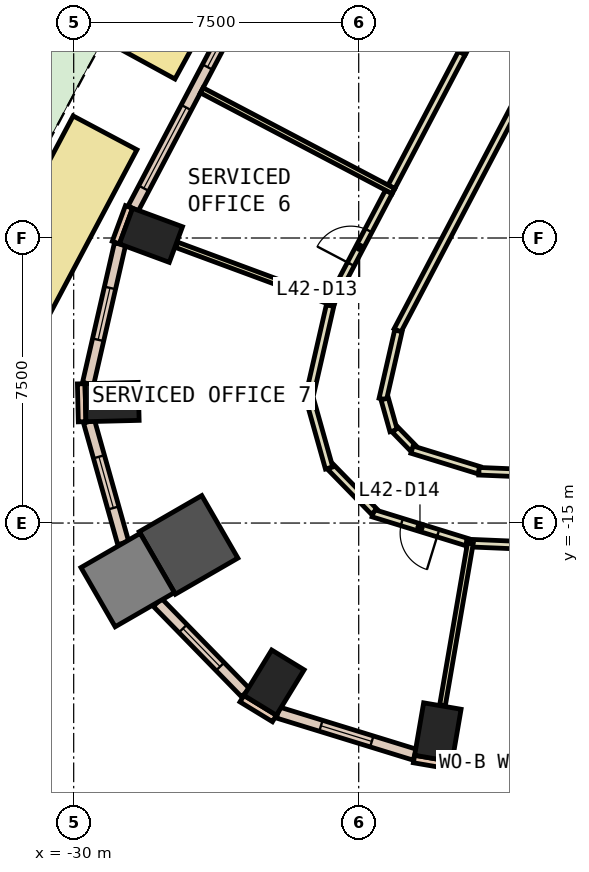
"""IFC4 building model, lengths in metres.
Left out: names, types, materials, properties, quantities, classifications, styles, units other than length and angle.
Written with IfcOpenShell. Run it as: python <this file> out.ifc"""

import sys

from ifc_helpers import new_model, si_unit, direction, frame, frame_2d, origin, origin_2d, place, context, subcontext, project, spatial, rectangle, extrude, element, fill, save


model = new_model("IFC4")
c1 = context("Model", 3, precision=1e-05, world=origin(), true_north=direction((0.0, 1.0)))
c2 = subcontext(c1, "Body", "Model", "MODEL_VIEW")
j1 = project(units=[si_unit("LENGTHUNIT", "METRE"), si_unit("PLANEANGLEUNIT", "RADIAN")], contexts=[c1])
p1 = place(None, origin())
s1 = spatial("IfcSite", under=j1, at=p1, CompositionType="ELEMENT")
p2 = place(p1, origin())
s2 = spatial("IfcBuilding", under=s1, at=p2, CompositionType="ELEMENT")
p3 = place(p2, frame((0.0, 0.0, 189.8)))
s3 = spatial("IfcBuildingStorey", under=s2, at=p3, CompositionType="ELEMENT", Elevation=189.8)
for number, where, z_axis, x_axis in (
    (1, (-20.417, -20.505, 0.0), (0.0, 0.0, 1.0), (-0.986, 0.169, 0.0)),
    (2, (-27.967, -7.429, 0.0), (0.0, 0.0, 1.0), (0.347, 0.938, 0.0)),
    (3, (-28.99, -11.816, 0.0), (0.0, 0.0, 1.0), (-0.025, 1.0, 0.0)),
):
    element("IfcColumn", number, at=place(p3, frame(where, z_axis=z_axis, x_axis=x_axis)), inside=s3, PredefinedType="COLUMN", context=c2, shape_type="SweptSolid", body=[
        extrude(rectangle(XDim=1.0, YDim=1.4, at=origin_2d()), origin(), (0.0, 0.0, 1.0), 3.8),
    ])
p4 = place(p3, frame((-26.977, -15.575, 0.0), z_axis=(0.0, 0.0, 1.0), x_axis=(0.866025403784, 0.5, 0.0)))
e4 = element("IfcColumn", 4, at=p4, inside=s3, PredefinedType="COLUMN", context=c2, shape_type="SweptSolid", body=[
    extrude(rectangle(XDim=1.9, YDim=1.9, at=origin_2d()), origin(), (0.0, 0.0, 1.0), 3.8),
])
p5 = place(p3, frame((-24.728, -19.199, 0.0), z_axis=(0.0, 0.0, 1.0), x_axis=(-0.853423465127, 0.521218178089, 0.0)))
e5 = element("IfcColumn", 5, at=p5, inside=s3, PredefinedType="COLUMN", context=c2, shape_type="SweptSolid", body=[
    extrude(rectangle(XDim=1.0, YDim=1.4, at=origin_2d()), origin(), (0.0, 0.0, 1.0), 3.8),
])
p6 = place(p3, frame((-28.579, -16.5, 0.0), z_axis=(0.0, 0.0, 1.0), x_axis=(0.866025403784, 0.5, 0.0)))
e6 = element("IfcColumn", 6, at=p6, inside=s3, PredefinedType="COLUMN", context=c2, shape_type="SweptSolid", body=[
    extrude(rectangle(XDim=1.8, YDim=1.8, at=origin_2d()), origin(), (0.0, 0.0, 1.0), 3.8),
])
for number, where, z_axis, x_axis in (
    (7, (-28.544, -6.683, 0.0), (0.0, 0.0, 1.0), (-0.347, -0.938, 0.0)),
    (8, (-21.045, -21.209, 0.0), (0.0, 0.0, 1.0), (0.986, -0.169, 0.0)),
):
    element("IfcWall", number, at=place(p3, frame(where, z_axis=z_axis, x_axis=x_axis)), inside=s3, PredefinedType="STANDARD", context=c2, shape_type="SweptSolid", body=[
        extrude(rectangle(XDim=1.0, YDim=0.2, at=frame_2d((0.5, 0.0))), origin(), (0.0, 0.0, 1.0), 3.8),
    ])
p7 = place(p3, frame((-29.802, -11.336, 0.0), z_axis=(0.0, 0.0, 1.0), x_axis=(0.023942303888, -0.999713341956, 0.0)))
e9 = element("IfcWall", 9, at=p7, inside=s3, PredefinedType="STANDARD", context=c2, shape_type="SweptSolid", body=[
    extrude(rectangle(XDim=0.999, YDim=0.2, at=frame_2d((0.5, 0.0))), origin(), (0.0, 0.0, 1.0), 3.8),
])
p8 = place(p3, frame((-25.572, -19.621, 0.0), z_axis=(0.0, 0.0, 1.0), x_axis=(0.853679739553, -0.520798331677, 0.0)))
e10 = element("IfcWall", 10, at=p8, inside=s3, PredefinedType="STANDARD", context=c2, shape_type="SweptSolid", body=[
    extrude(rectangle(XDim=1.0, YDim=0.2, at=frame_2d((0.5, 0.0))), origin(), (0.0, 0.0, 1.0), 3.8),
])
p9 = place(p3, frame((-20.041, -21.264, 0.0), z_axis=(0.0, 0.0, 1.0), x_axis=(0.999127941775, -0.041753514387, 0.0)))
e11 = element("IfcWall", 11, at=p9, inside=s3, PredefinedType="STANDARD", context=c2, shape_type="SweptSolid", body=[
    extrude(rectangle(XDim=5.368, YDim=0.3, at=frame_2d((2.684, 0.0))), origin(), (0.0, 0.0, 1.0), 3.8),
])
p10 = place(p9, frame((0.642, 0.0, 0.9)))
e12 = element("IfcOpeningElement", 12, at=p10, cuts=e11, PredefinedType="OPENING", context=c2, shape_type="SweptSolid", body=[
    extrude(rectangle(XDim=1.4, YDim=2.6, at=frame_2d((0.7, 1.3))), frame((0.0, 0.16, 0.0), z_axis=(0.0, -1.0, 0.0), x_axis=(1.0, 0.0, 0.0)), (0.0, 0.0, 1.0), 0.32),
])
p11 = place(p9, frame((3.326, 0.0, 0.9)))
e13 = element("IfcOpeningElement", 13, at=p11, cuts=e11, PredefinedType="OPENING", context=c2, shape_type="SweptSolid", body=[
    extrude(rectangle(XDim=1.4, YDim=2.6, at=frame_2d((0.7, 1.3))), frame((0.0, 0.16, 0.0), z_axis=(0.0, -1.0, 0.0), x_axis=(1.0, 0.0, 0.0)), (0.0, 0.0, 1.0), 0.32),
])
p12 = place(p3, frame((-25.08, -0.345, 0.0), z_axis=(0.0, 0.0, 1.0), x_axis=(-0.465478369088, -0.885059256723, 0.0)))
e14 = element("IfcWall", 14, at=p12, inside=s3, PredefinedType="STANDARD", context=c2, shape_type="SweptSolid", body=[
    extrude(rectangle(XDim=7.208, YDim=0.3, at=frame_2d((3.604, 0.0))), origin(), (0.0, 0.0, 1.0), 3.8),
])
p13 = place(p12, frame((0.602, 0.0, 0.9)))
e15 = element("IfcOpeningElement", 15, at=p13, cuts=e14, PredefinedType="OPENING", context=c2, shape_type="SweptSolid", body=[
    extrude(rectangle(XDim=2.4, YDim=2.6, at=frame_2d((1.2, 1.3))), frame((0.0, 0.16, 0.0), z_axis=(0.0, -1.0, 0.0), x_axis=(1.0, 0.0, 0.0)), (0.0, 0.0, 1.0), 0.32),
])
p14 = place(p12, frame((4.206, 0.0, 0.9)))
e16 = element("IfcOpeningElement", 16, at=p14, cuts=e14, PredefinedType="OPENING", context=c2, shape_type="SweptSolid", body=[
    extrude(rectangle(XDim=2.4, YDim=2.6, at=frame_2d((1.2, 1.3))), frame((0.0, 0.16, 0.0), z_axis=(0.0, -1.0, 0.0), x_axis=(1.0, 0.0, 0.0)), (0.0, 0.0, 1.0), 0.32),
])
p15 = place(p3, frame((-28.781, -7.66, 0.0), z_axis=(0.0, 0.0, 1.0), x_axis=(-0.223013094864, -0.974815448954, 0.0)))
e17 = element("IfcWall", 17, at=p15, inside=s3, PredefinedType="STANDARD", context=c2, shape_type="SweptSolid", body=[
    extrude(rectangle(XDim=3.767, YDim=0.3, at=frame_2d((1.884, 0.0))), origin(), (0.0, 0.0, 1.0), 3.8),
])
p16 = place(p15, frame((1.183, 0.0, 0.9)))
e18 = element("IfcOpeningElement", 18, at=p16, cuts=e17, PredefinedType="OPENING", context=c2, shape_type="SweptSolid", body=[
    extrude(rectangle(XDim=1.4, YDim=2.6, at=frame_2d((0.7, 1.3))), frame((0.0, 0.16, 0.0), z_axis=(0.0, -1.0, 0.0), x_axis=(1.0, 0.0, 0.0)), (0.0, 0.0, 1.0), 0.32),
])
p17 = place(p3, frame((-29.596, -12.33, 0.0), z_axis=(0.0, 0.0, 1.0), x_axis=(0.270798765166, -0.962635979374, 0.0)))
e19 = element("IfcWall", 19, at=p17, inside=s3, PredefinedType="STANDARD", context=c2, shape_type="SweptSolid", body=[
    extrude(rectangle(XDim=3.323, YDim=0.3, at=frame_2d((1.662, 0.0))), origin(), (0.0, 0.0, 1.0), 3.8),
])
p18 = place(p17, frame((0.962, 0.0, 0.9)))
e20 = element("IfcOpeningElement", 20, at=p18, cuts=e19, PredefinedType="OPENING", context=c2, shape_type="SweptSolid", body=[
    extrude(rectangle(XDim=1.4, YDim=2.6, at=frame_2d((0.7, 1.3))), frame((0.0, 0.16, 0.0), z_axis=(0.0, -1.0, 0.0), x_axis=(1.0, 0.0, 0.0)), (0.0, 0.0, 1.0), 0.32),
])
p19 = place(p3, frame((-27.797, -17.087, 0.0), z_axis=(0.0, 0.0, 1.0), x_axis=(0.698311919602, -0.71579358962, 0.0)))
e21 = element("IfcWall", 21, at=p19, inside=s3, PredefinedType="STANDARD", context=c2, shape_type="SweptSolid", body=[
    extrude(rectangle(XDim=3.324, YDim=0.3, at=frame_2d((1.662, 0.0))), origin(), (0.0, 0.0, 1.0), 3.8),
])
p20 = place(p19, frame((0.962, 0.0, 0.9)))
e22 = element("IfcOpeningElement", 22, at=p20, cuts=e21, PredefinedType="OPENING", context=c2, shape_type="SweptSolid", body=[
    extrude(rectangle(XDim=1.4, YDim=2.6, at=frame_2d((0.7, 1.3))), frame((0.0, 0.16, 0.0), z_axis=(0.0, -1.0, 0.0), x_axis=(1.0, 0.0, 0.0)), (0.0, 0.0, 1.0), 0.32),
])
p21 = place(p3, frame((-24.624, -19.986, 0.0), z_axis=(0.0, 0.0, 1.0), x_axis=(0.955692086233, -0.29436819854, 0.0)))
e23 = element("IfcWall", 23, at=p21, inside=s3, PredefinedType="STANDARD", context=c2, shape_type="SweptSolid", body=[
    extrude(rectangle(XDim=3.767, YDim=0.3, at=frame_2d((1.884, 0.0))), origin(), (0.0, 0.0, 1.0), 3.8),
])
p22 = place(p21, frame((1.183, 0.0, 0.9)))
e24 = element("IfcOpeningElement", 24, at=p22, cuts=e23, PredefinedType="OPENING", context=c2, shape_type="SweptSolid", body=[
    extrude(rectangle(XDim=1.4, YDim=2.6, at=frame_2d((0.7, 1.3))), frame((0.0, 0.16, 0.0), z_axis=(0.0, -1.0, 0.0), x_axis=(1.0, 0.0, 0.0)), (0.0, 0.0, 1.0), 0.32),
])
p23 = place(p3, frame((-25.793, 1.486, 0.0), z_axis=(0.0, 0.0, 1.0), x_axis=(-0.479445954257, -0.87757140846, 0.0)))
e25 = element("IfcWall", 25, at=p23, inside=s3, PredefinedType="STANDARD", context=c2, shape_type="SweptSolid", body=[
    extrude(rectangle(XDim=4.954, YDim=1.9, at=frame_2d((2.477, 0.0))), origin(), (0.0, 0.0, 1.0), 0.8),
])
p24 = place(p3, frame((-29.175, -4.733, 0.0), z_axis=(0.0, 0.0, 1.0), x_axis=(-0.468659554366, -0.883378866683, 0.0)))
e26 = element("IfcWall", 26, at=p24, inside=s3, PredefinedType="STANDARD", context=c2, shape_type="SweptSolid", body=[
    extrude(rectangle(XDim=5.115, YDim=1.9, at=frame_2d((2.557, 0.0))), origin(), (0.0, 0.0, 1.0), 0.8),
])
p25 = place(p3, frame((-18.112, -3.531, 0.0), z_axis=(0.0, 0.0, 1.0), x_axis=(-0.465461327558, -0.885068219149, 0.0)))
e27 = element("IfcWall", 27, at=p25, inside=s3, PredefinedType="PARTITIONING", context=c2, shape_type="SweptSolid", body=[
    extrude(rectangle(XDim=7.236, YDim=0.2, at=frame_2d((3.618, 0.0))), origin(), (0.0, 0.0, 1.0), 3.8),
])
p26 = place(p3, frame((-21.456, -9.944, 0.0), z_axis=(0.0, 0.0, 1.0), x_axis=(-0.222871656966, -0.974847795567, 0.0)))
e28 = element("IfcWall", 28, at=p26, inside=s3, PredefinedType="PARTITIONING", context=c2, shape_type="SweptSolid", body=[
    extrude(rectangle(XDim=1.839, YDim=0.2, at=frame_2d((0.919, 0.0))), origin(), (0.0, 0.0, 1.0), 3.8),
])
p27 = place(p3, frame((-21.816, -11.735, 0.0), z_axis=(0.0, 0.0, 1.0), x_axis=(0.270192443589, -0.962806337447, 0.0)))
e29 = element("IfcWall", 29, at=p27, inside=s3, PredefinedType="PARTITIONING", context=c2, shape_type="SweptSolid", body=[
    extrude(rectangle(XDim=0.869, YDim=0.2, at=frame_2d((0.435, 0.0))), origin(), (0.0, 0.0, 1.0), 3.8),
])
p28 = place(p3, frame((-21.538, -12.547, 0.0), z_axis=(0.0, 0.0, 1.0), x_axis=(0.697542638825, -0.716543276446, 0.0)))
e30 = element("IfcWall", 30, at=p28, inside=s3, PredefinedType="PARTITIONING", context=c2, shape_type="SweptSolid", body=[
    extrude(rectangle(XDim=0.668, YDim=0.2, at=frame_2d((0.334, 0.0))), origin(), (0.0, 0.0, 1.0), 3.8),
])
p29 = place(p3, frame((-21.097, -13.068, 0.0), z_axis=(0.0, 0.0, 1.0), x_axis=(0.955790442908, -0.294048685161, 0.0)))
e31 = element("IfcWall", 31, at=p29, inside=s3, PredefinedType="PARTITIONING", context=c2, shape_type="SweptSolid", body=[
    extrude(rectangle(XDim=1.846, YDim=0.2, at=frame_2d((0.923, 0.0))), origin(), (0.0, 0.0, 1.0), 3.8),
])
p30 = place(p3, frame((-19.336, -13.637, 0.0), z_axis=(0.0, 0.0, 1.0), x_axis=(0.999130261307, -0.041697972867, 0.0)))
e32 = element("IfcWall", 32, at=p30, inside=s3, PredefinedType="PARTITIONING", context=c2, shape_type="SweptSolid", body=[
    extrude(rectangle(XDim=5.422, YDim=0.2, at=frame_2d((2.711, 0.0))), origin(), (0.0, 0.0, 1.0), 3.8),
])
p31 = place(p3, frame((-21.638, -6.154, 0.0), z_axis=(0.0, 0.0, 1.0), x_axis=(0.465392595139, 0.885104362428, 0.0)))
e33 = element("IfcWall", 33, at=p31, inside=s3, PredefinedType="PARTITIONING", context=c2, shape_type="SweptSolid", body=[
    extrude(rectangle(XDim=3.982, YDim=0.2, at=frame_2d((1.991, 0.0))), origin(), (0.0, 0.0, 1.0), 3.8),
])
p32 = place(p3, frame((-19.785, -2.63, 0.0), z_axis=(0.0, 0.0, 1.0), x_axis=(0.482817232578, 0.875721142788, 0.0)))
e34 = element("IfcWall", 34, at=p32, inside=s3, PredefinedType="PARTITIONING", context=c2, shape_type="SweptSolid", body=[
    extrude(rectangle(XDim=8.04, YDim=0.2, at=frame_2d((4.02, 0.0))), origin(), (0.0, 0.0, 1.0), 3.8),
])
p33 = place(p32, frame((3.595, 0.0, 0.0)))
e35 = element("IfcOpeningElement", 35, at=p33, cuts=e34, PredefinedType="OPENING", context=c2, shape_type="SweptSolid", body=[
    extrude(rectangle(XDim=1.0, YDim=2.1, at=frame_2d((0.5, 1.05))), frame((0.0, 0.11, 0.0), z_axis=(0.0, -1.0, 0.0), x_axis=(1.0, 0.0, 0.0)), (0.0, 0.0, 1.0), 0.22),
])
p34 = place(p3, frame((-23.242, -9.204, 0.0), z_axis=(0.0, 0.0, 1.0), x_axis=(0.465431933571, 0.885083676955, 0.0)))
e36 = element("IfcWall", 36, at=p34, inside=s3, PredefinedType="PARTITIONING", context=c2, shape_type="SweptSolid", body=[
    extrude(rectangle(XDim=3.296, YDim=0.2, at=frame_2d((1.648, 0.0))), origin(), (0.0, 0.0, 1.0), 3.8),
])
p35 = place(p34, frame((1.148, 0.0, 0.0)))
e37 = element("IfcOpeningElement", 37, at=p35, cuts=e36, PredefinedType="OPENING", context=c2, shape_type="SweptSolid", body=[
    extrude(rectangle(XDim=1.0, YDim=2.1, at=frame_2d((0.5, 1.05))), frame((0.0, 0.11, 0.0), z_axis=(0.0, -1.0, 0.0), x_axis=(1.0, 0.0, 0.0)), (0.0, 0.0, 1.0), 0.22),
])
p36 = place(p3, frame((-19.657, -15.5, 0.0), z_axis=(0.0, 0.0, 1.0), x_axis=(-0.955612889251, 0.294625195625, 0.0)))
e38 = element("IfcWall", 38, at=p36, inside=s3, PredefinedType="PARTITIONING", context=c2, shape_type="SweptSolid", body=[
    extrude(rectangle(XDim=2.576, YDim=0.2, at=frame_2d((1.288, 0.0))), origin(), (0.0, 0.0, 1.0), 3.8),
])
p37 = place(p36, frame((0.788, 0.0, 0.0)))
e39 = element("IfcOpeningElement", 39, at=p37, cuts=e38, PredefinedType="OPENING", context=c2, shape_type="SweptSolid", body=[
    extrude(rectangle(XDim=1.0, YDim=2.1, at=frame_2d((0.5, 1.05))), frame((0.0, 0.11, 0.0), z_axis=(0.0, -1.0, 0.0), x_axis=(1.0, 0.0, 0.0)), (0.0, 0.0, 1.0), 0.22),
])
p38 = place(p3, frame((-22.093, -14.699, 0.0), z_axis=(0.0, 0.0, 1.0), x_axis=(-0.698551276451, 0.715560000397, 0.0)))
e40 = element("IfcWall", 40, at=p38, inside=s3, PredefinedType="PARTITIONING", context=c2, shape_type="SweptSolid", body=[
    extrude(rectangle(XDim=1.636, YDim=0.2, at=frame_2d((0.818, 0.0))), origin(), (0.0, 0.0, 1.0), 3.8),
])
p39 = place(p3, frame((-23.279, -13.552, 0.0), z_axis=(0.0, 0.0, 1.0), x_axis=(-0.270522287318, 0.962713712411, 0.0)))
e41 = element("IfcWall", 41, at=p39, inside=s3, PredefinedType="PARTITIONING", context=c2, shape_type="SweptSolid", body=[
    extrude(rectangle(XDim=1.836, YDim=0.2, at=frame_2d((0.918, 0.0))), origin(), (0.0, 0.0, 1.0), 3.8),
])
p40 = place(p3, frame((-23.826, -11.785, 0.0), z_axis=(0.0, 0.0, 1.0), x_axis=(0.222909903746, 0.974839050722, 0.0)))
e42 = element("IfcWall", 42, at=p40, inside=s3, PredefinedType="PARTITIONING", context=c2, shape_type="SweptSolid", body=[
    extrude(rectangle(XDim=2.571, YDim=0.2, at=frame_2d((1.285, 0.0))), origin(), (0.0, 0.0, 1.0), 3.8),
])
p41 = place(p3, frame((-13.984, -15.762, 0.0), z_axis=(0.0, 0.0, 1.0), x_axis=(-0.999129271091, 0.041721692781, 0.0)))
e43 = element("IfcWall", 43, at=p41, inside=s3, PredefinedType="PARTITIONING", context=c2, shape_type="SweptSolid", body=[
    extrude(rectangle(XDim=5.682, YDim=0.2, at=frame_2d((2.841, 0.0))), origin(), (0.0, 0.0, 1.0), 3.8),
])
p42 = place(p41, frame((2.341, 0.0, 0.0)))
e44 = element("IfcOpeningElement", 44, at=p42, cuts=e43, PredefinedType="OPENING", context=c2, shape_type="SweptSolid", body=[
    extrude(rectangle(XDim=1.0, YDim=2.1, at=frame_2d((0.5, 1.05))), frame((0.0, 0.11, 0.0), z_axis=(0.0, -1.0, 0.0), x_axis=(1.0, 0.0, 0.0)), (0.0, 0.0, 1.0), 0.22),
])
p43 = place(p3, frame((-21.585, -6.267, 0.0), z_axis=(0.0, 0.0, 1.0), x_axis=(-0.885073333504, 0.465451602554, 0.0)))
e45 = element("IfcWall", 45, at=p43, inside=s3, PredefinedType="PARTITIONING", context=c2, shape_type="SweptSolid", body=[
    extrude(rectangle(XDim=5.7, YDim=0.15, at=frame_2d((2.85, 0.0))), origin(), (0.0, 0.0, 1.0), 3.8),
])
p44 = place(p3, frame((-23.137, -9.217, 0.0), z_axis=(0.0, 0.0, 1.0), x_axis=(-0.937808569806, 0.34715282859, 0.0)))
e46 = element("IfcWall", 46, at=p44, inside=s3, PredefinedType="PARTITIONING", context=c2, shape_type="SweptSolid", body=[
    extrude(rectangle(XDim=4.431, YDim=0.15, at=frame_2d((2.215, 0.0))), origin(), (0.0, 0.0, 1.0), 3.8),
])
p45 = place(p3, frame((-19.561, -15.529, 0.0), z_axis=(0.0, 0.0, 1.0), x_axis=(-0.169546150064, -0.98552224886, 0.0)))
e47 = element("IfcWall", 47, at=p45, inside=s3, PredefinedType="PARTITIONING", context=c2, shape_type="SweptSolid", body=[
    extrude(rectangle(XDim=4.329, YDim=0.15, at=frame_2d((2.164, 0.0))), origin(), (0.0, 0.0, 1.0), 3.8),
])
p46 = place(p10, origin())
e48 = element("IfcWindow", 48, at=p46, inside=s3, PartitioningType="SINGLE_PANEL", PredefinedType="WINDOW", context=c2, shape_type="SweptSolid", body=[
    extrude(rectangle(XDim=1.4, YDim=2.6, at=frame_2d((0.7, 1.3))), frame((0.0, 0.03, 0.0), z_axis=(0.0, -1.0, 0.0), x_axis=(1.0, 0.0, 0.0)), (0.0, 0.0, 1.0), 0.06),
])
fill(e12, e48)
p47 = place(p13, origin())
e49 = element("IfcWindow", 49, at=p47, inside=s3, PartitioningType="SINGLE_PANEL", PredefinedType="WINDOW", context=c2, shape_type="SweptSolid", body=[
    extrude(rectangle(XDim=2.4, YDim=2.6, at=frame_2d((1.2, 1.3))), frame((0.0, 0.03, 0.0), z_axis=(0.0, -1.0, 0.0), x_axis=(1.0, 0.0, 0.0)), (0.0, 0.0, 1.0), 0.06),
])
fill(e15, e49)
p48 = place(p14, origin())
e50 = element("IfcWindow", 50, at=p48, inside=s3, PartitioningType="SINGLE_PANEL", PredefinedType="WINDOW", context=c2, shape_type="SweptSolid", body=[
    extrude(rectangle(XDim=2.4, YDim=2.6, at=frame_2d((1.2, 1.3))), frame((0.0, 0.03, 0.0), z_axis=(0.0, -1.0, 0.0), x_axis=(1.0, 0.0, 0.0)), (0.0, 0.0, 1.0), 0.06),
])
fill(e16, e50)
p49 = place(p16, origin())
e51 = element("IfcWindow", 51, at=p49, inside=s3, PartitioningType="SINGLE_PANEL", PredefinedType="WINDOW", context=c2, shape_type="SweptSolid", body=[
    extrude(rectangle(XDim=1.4, YDim=2.6, at=frame_2d((0.7, 1.3))), frame((0.0, 0.03, 0.0), z_axis=(0.0, -1.0, 0.0), x_axis=(1.0, 0.0, 0.0)), (0.0, 0.0, 1.0), 0.06),
])
fill(e18, e51)
p50 = place(p18, origin())
e52 = element("IfcWindow", 52, at=p50, inside=s3, PartitioningType="SINGLE_PANEL", PredefinedType="WINDOW", context=c2, shape_type="SweptSolid", body=[
    extrude(rectangle(XDim=1.4, YDim=2.6, at=frame_2d((0.7, 1.3))), frame((0.0, 0.03, 0.0), z_axis=(0.0, -1.0, 0.0), x_axis=(1.0, 0.0, 0.0)), (0.0, 0.0, 1.0), 0.06),
])
fill(e20, e52)
p51 = place(p20, origin())
e53 = element("IfcWindow", 53, at=p51, inside=s3, PartitioningType="SINGLE_PANEL", PredefinedType="WINDOW", context=c2, shape_type="SweptSolid", body=[
    extrude(rectangle(XDim=1.4, YDim=2.6, at=frame_2d((0.7, 1.3))), frame((0.0, 0.03, 0.0), z_axis=(0.0, -1.0, 0.0), x_axis=(1.0, 0.0, 0.0)), (0.0, 0.0, 1.0), 0.06),
])
fill(e22, e53)
p52 = place(p22, origin())
e54 = element("IfcWindow", 54, at=p52, inside=s3, PartitioningType="SINGLE_PANEL", PredefinedType="WINDOW", context=c2, shape_type="SweptSolid", body=[
    extrude(rectangle(XDim=1.4, YDim=2.6, at=frame_2d((0.7, 1.3))), frame((0.0, 0.03, 0.0), z_axis=(0.0, -1.0, 0.0), x_axis=(1.0, 0.0, 0.0)), (0.0, 0.0, 1.0), 0.06),
])
fill(e24, e54)
p53 = place(p35, origin())
e55 = element("IfcDoor", 55, at=p53, inside=s3, OperationType="SINGLE_SWING_RIGHT", PredefinedType="DOOR", context=c2, shape_type="SweptSolid", body=[
    extrude(rectangle(XDim=1.0, YDim=2.1, at=frame_2d((0.5, 1.05))), frame((0.0, 0.025, 0.0), z_axis=(0.0, -1.0, 0.0), x_axis=(1.0, 0.0, 0.0)), (0.0, 0.0, 1.0), 0.05),
])
fill(e37, e55)
p54 = place(p37, origin())
e56 = element("IfcDoor", 56, at=p54, inside=s3, OperationType="SINGLE_SWING_LEFT", PredefinedType="DOOR", context=c2, shape_type="SweptSolid", body=[
    extrude(rectangle(XDim=1.0, YDim=2.1, at=frame_2d((0.5, 1.05))), frame((0.0, 0.025, 0.0), z_axis=(0.0, -1.0, 0.0), x_axis=(1.0, 0.0, 0.0)), (0.0, 0.0, 1.0), 0.05),
])
fill(e39, e56)
save(model, sys.argv[1])
